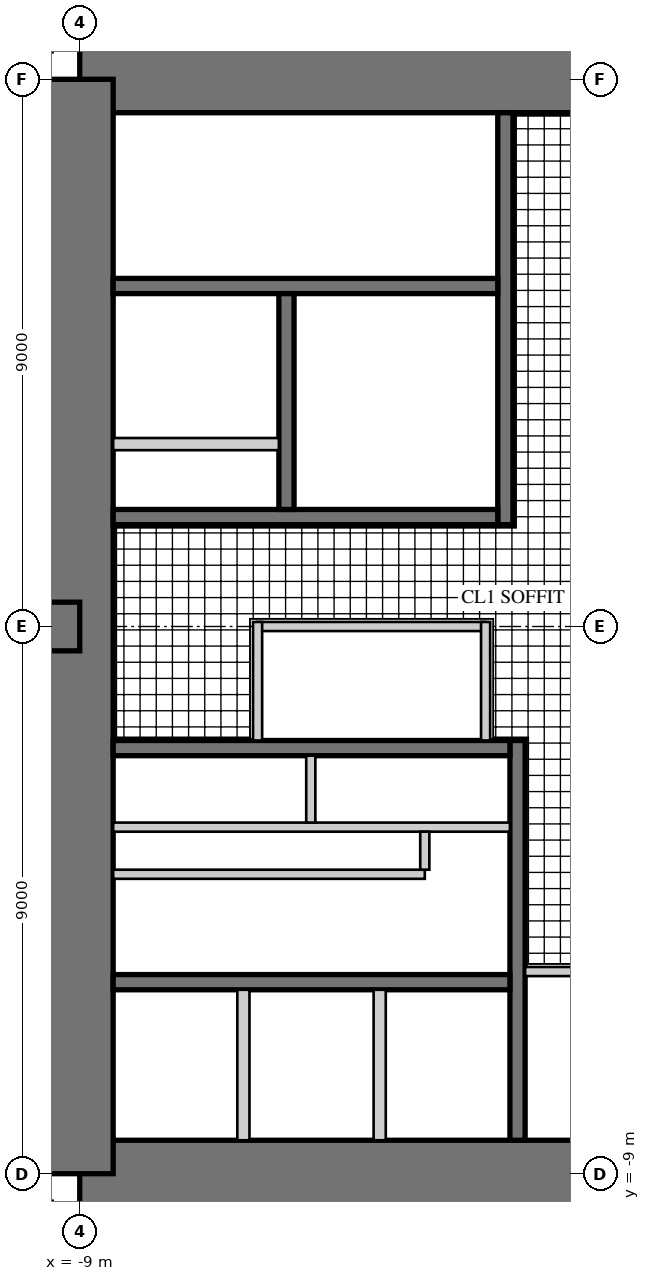
"""IFC4 building model, lengths in metres.
Left out: names, types, materials, properties, quantities, classifications, styles, units other than length and angle.
Written with IfcOpenShell. Run it as: python <this file> out.ifc"""

import sys

from ifc_helpers import new_model, si_unit, direction, frame, frame_2d, origin, place, context, subcontext, project, spatial, rectangle, extrude, element, fill, save


model = new_model("IFC4")
c1 = context("Model", 3, precision=1e-05, world=origin(), true_north=direction((0.0, 1.0)))
c2 = subcontext(c1, "Body", "Model", "MODEL_VIEW")
j1 = project(units=[si_unit("LENGTHUNIT", "METRE"), si_unit("PLANEANGLEUNIT", "RADIAN")], contexts=[c1])
p1 = place(None, origin())
s1 = spatial("IfcSite", under=j1, at=p1, CompositionType="ELEMENT")
p2 = place(p1, origin())
s2 = spatial("IfcBuilding", under=s1, at=p2, CompositionType="ELEMENT")
p3 = place(p2, frame((0.0, 0.0, 206.9)))
s3 = spatial("IfcBuildingStorey", under=s2, at=p3, CompositionType="ELEMENT", Elevation=206.9)
p4 = place(p3, frame((9.0, 9.0, 0.0), z_axis=(0.0, 0.0, 1.0), x_axis=(-1.0, 0.0, 0.0)))
e1 = element("IfcWall", 1, at=p4, inside=s3, PredefinedType="SHEAR", context=c2, shape_type="SweptSolid", body=[
    extrude(rectangle(XDim=18.0, YDim=1.1, at=frame_2d((9.0, 0.0))), origin(), (0.0, 0.0, 1.0), 3.4),
])
p5 = place(p4, frame((9.8, 0.0, 0.0)))
e2 = element("IfcOpeningElement", 2, at=p5, cuts=e1, PredefinedType="OPENING", context=c2, shape_type="SweptSolid", body=[
    extrude(rectangle(XDim=1.0, YDim=2.4, at=frame_2d((0.5, 1.2))), frame((0.0, 0.56, 0.0), z_axis=(0.0, -1.0, 0.0), x_axis=(1.0, 0.0, 0.0)), (0.0, 0.0, 1.0), 1.12),
])
p6 = place(p3, frame((-9.0, -9.0, 0.0), z_axis=(0.0, 0.0, 1.0), x_axis=(1.0, 0.0, 0.0)))
e3 = element("IfcWall", 3, at=p6, inside=s3, PredefinedType="SHEAR", context=c2, shape_type="SweptSolid", body=[
    extrude(rectangle(XDim=18.0, YDim=1.1, at=frame_2d((9.0, 0.0))), origin(), (0.0, 0.0, 1.0), 3.4),
])
p7 = place(p6, frame((9.8, 0.0, 0.0)))
e4 = element("IfcOpeningElement", 4, at=p7, cuts=e3, PredefinedType="OPENING", context=c2, shape_type="SweptSolid", body=[
    extrude(rectangle(XDim=1.0, YDim=2.4, at=frame_2d((0.5, 1.2))), frame((0.0, 0.56, 0.0), z_axis=(0.0, -1.0, 0.0), x_axis=(1.0, 0.0, 0.0)), (0.0, 0.0, 1.0), 1.12),
])
p8 = place(p3, frame((-9.0, 9.0, 0.0), z_axis=(0.0, 0.0, 1.0), x_axis=(0.0, -1.0, 0.0)))
e5 = element("IfcWall", 5, at=p8, inside=s3, PredefinedType="SHEAR", context=c2, shape_type="SweptSolid", body=[
    extrude(rectangle(XDim=18.0, YDim=1.1, at=frame_2d((9.0, 0.0))), origin(), (0.0, 0.0, 1.0), 3.4),
])
p9 = place(p8, frame((9.8, 0.0, 0.0)))
e6 = element("IfcOpeningElement", 6, at=p9, cuts=e5, PredefinedType="OPENING", context=c2, shape_type="SweptSolid", body=[
    extrude(rectangle(XDim=1.0, YDim=2.4, at=frame_2d((0.5, 1.2))), frame((0.0, 0.56, 0.0), z_axis=(0.0, -1.0, 0.0), x_axis=(1.0, 0.0, 0.0)), (0.0, 0.0, 1.0), 1.12),
])
p10 = place(p3, frame((-2.0, 1.675, 0.0), z_axis=(0.0, 0.0, 1.0), x_axis=(0.0, 1.0, 0.0)))
e7 = element("IfcWall", 7, at=p10, inside=s3, PredefinedType="SHEAR", context=c2, shape_type="SweptSolid", body=[
    extrude(rectangle(XDim=6.775, YDim=0.25, at=frame_2d((3.387, 0.0))), origin(), (0.0, 0.0, 1.0), 3.4),
])
p11 = place(p10, frame((0.725, 0.0, 0.0)))
e8 = element("IfcOpeningElement", 8, at=p11, cuts=e7, PredefinedType="OPENING", context=c2, shape_type="SweptSolid", body=[
    extrude(rectangle(XDim=1.0, YDim=2.1, at=frame_2d((0.5, 1.05))), frame((0.0, 0.135, 0.0), z_axis=(0.0, -1.0, 0.0), x_axis=(1.0, 0.0, 0.0)), (0.0, 0.0, 1.0), 0.27),
])
p12 = place(p3, frame((-2.125, 1.8, 0.0), z_axis=(0.0, 0.0, 1.0), x_axis=(-1.0, 0.0, 0.0)))
e9 = element("IfcWall", 9, at=p12, inside=s3, PredefinedType="SHEAR", context=c2, shape_type="SweptSolid", body=[
    extrude(rectangle(XDim=6.325, YDim=0.25, at=frame_2d((3.163, 0.0))), origin(), (0.0, 0.0, 1.0), 3.4),
])
p13 = place(p3, frame((-2.125, 5.6, 0.0), z_axis=(0.0, 0.0, 1.0), x_axis=(-1.0, 0.0, 0.0)))
e10 = element("IfcWall", 10, at=p13, inside=s3, PredefinedType="SHEAR", context=c2, shape_type="SweptSolid", body=[
    extrude(rectangle(XDim=6.325, YDim=0.25, at=frame_2d((3.163, 0.0))), origin(), (0.0, 0.0, 1.0), 3.4),
])
p14 = place(p13, frame((0.175, 0.0, 0.0)))
e11 = element("IfcOpeningElement", 11, at=p14, cuts=e10, PredefinedType="OPENING", context=c2, shape_type="SweptSolid", body=[
    extrude(rectangle(XDim=1.0, YDim=2.1, at=frame_2d((0.5, 1.05))), frame((0.0, 0.135, 0.0), z_axis=(0.0, -1.0, 0.0), x_axis=(1.0, 0.0, 0.0)), (0.0, 0.0, 1.0), 0.27),
])
p15 = place(p3, frame((-5.6, 1.925, 0.0), z_axis=(0.0, 0.0, 1.0), x_axis=(0.0, 1.0, 0.0)))
e12 = element("IfcWall", 12, at=p15, inside=s3, PredefinedType="SHEAR", context=c2, shape_type="SweptSolid", body=[
    extrude(rectangle(XDim=3.55, YDim=0.25, at=frame_2d((1.775, 0.0))), origin(), (0.0, 0.0, 1.0), 3.4),
])
p16 = place(p15, frame((1.525, 0.0, 0.0)))
e13 = element("IfcOpeningElement", 13, at=p16, cuts=e12, PredefinedType="OPENING", context=c2, shape_type="SweptSolid", body=[
    extrude(rectangle(XDim=1.1, YDim=2.2, at=frame_2d((0.55, 1.1))), frame((0.0, 0.135, 0.0), z_axis=(0.0, -1.0, 0.0), x_axis=(1.0, 0.0, 0.0)), (0.0, 0.0, 1.0), 0.27),
])
p17 = place(p15, frame((0.075, 0.0, 0.0)))
e14 = element("IfcOpeningElement", 14, at=p17, cuts=e12, PredefinedType="OPENING", context=c2, shape_type="SweptSolid", body=[
    extrude(rectangle(XDim=0.8, YDim=2.1, at=frame_2d((0.4, 1.05))), frame((0.0, 0.135, 0.0), z_axis=(0.0, -1.0, 0.0), x_axis=(1.0, 0.0, 0.0)), (0.0, 0.0, 1.0), 0.27),
])
p18 = place(p3, frame((-5.725, 3.0, 0.0), z_axis=(0.0, 0.0, 1.0), x_axis=(-1.0, 0.0, 0.0)))
e15 = element("IfcWall", 15, at=p18, inside=s3, PredefinedType="PARTITIONING", context=c2, shape_type="SweptSolid", body=[
    extrude(rectangle(XDim=2.725, YDim=0.2, at=frame_2d((1.362, 0.0))), origin(), (0.0, 0.0, 1.0), 3.4),
])
p19 = place(p3, frame((-1.8, -1.875, 0.0), z_axis=(0.0, 0.0, 1.0), x_axis=(0.0, -1.0, 0.0)))
e16 = element("IfcWall", 16, at=p19, inside=s3, PredefinedType="SHEAR", context=c2, shape_type="SweptSolid", body=[
    extrude(rectangle(XDim=6.575, YDim=0.25, at=frame_2d((3.288, 0.0))), origin(), (0.0, 0.0, 1.0), 3.4),
])
p20 = place(p19, frame((1.875, 0.0, 0.0)))
e17 = element("IfcOpeningElement", 17, at=p20, cuts=e16, PredefinedType="OPENING", context=c2, shape_type="SweptSolid", body=[
    extrude(rectangle(XDim=1.6, YDim=2.4, at=frame_2d((0.8, 1.2))), frame((0.0, 0.135, 0.0), z_axis=(0.0, -1.0, 0.0), x_axis=(1.0, 0.0, 0.0)), (0.0, 0.0, 1.0), 0.27),
])
p21 = place(p3, frame((-1.925, -2.0, 0.0), z_axis=(0.0, 0.0, 1.0), x_axis=(-1.0, 0.0, 0.0)))
e18 = element("IfcWall", 18, at=p21, inside=s3, PredefinedType="SHEAR", context=c2, shape_type="SweptSolid", body=[
    extrude(rectangle(XDim=6.525, YDim=0.25, at=frame_2d((3.262, 0.0))), origin(), (0.0, 0.0, 1.0), 3.4),
])
p22 = place(p3, frame((-1.925, -5.85, 0.0), z_axis=(0.0, 0.0, 1.0), x_axis=(-1.0, 0.0, 0.0)))
e19 = element("IfcWall", 19, at=p22, inside=s3, PredefinedType="SHEAR", context=c2, shape_type="SweptSolid", body=[
    extrude(rectangle(XDim=6.525, YDim=0.25, at=frame_2d((3.262, 0.0))), origin(), (0.0, 0.0, 1.0), 3.4),
])
p23 = place(p22, frame((0.471, 0.0, 0.0)))
e20 = element("IfcOpeningElement", 20, at=p23, cuts=e19, PredefinedType="OPENING", context=c2, shape_type="SweptSolid", body=[
    extrude(rectangle(XDim=1.1, YDim=2.2, at=frame_2d((0.55, 1.1))), frame((0.0, 0.135, 0.0), z_axis=(0.0, -1.0, 0.0), x_axis=(1.0, 0.0, 0.0)), (0.0, 0.0, 1.0), 0.27),
])
p24 = place(p22, frame((2.712, 0.0, 0.0)))
e21 = element("IfcOpeningElement", 21, at=p24, cuts=e19, PredefinedType="OPENING", context=c2, shape_type="SweptSolid", body=[
    extrude(rectangle(XDim=1.1, YDim=2.2, at=frame_2d((0.55, 1.1))), frame((0.0, 0.135, 0.0), z_axis=(0.0, -1.0, 0.0), x_axis=(1.0, 0.0, 0.0)), (0.0, 0.0, 1.0), 0.27),
])
p25 = place(p22, frame((4.954, 0.0, 0.0)))
e22 = element("IfcOpeningElement", 22, at=p25, cuts=e19, PredefinedType="OPENING", context=c2, shape_type="SweptSolid", body=[
    extrude(rectangle(XDim=1.1, YDim=2.2, at=frame_2d((0.55, 1.1))), frame((0.0, 0.135, 0.0), z_axis=(0.0, -1.0, 0.0), x_axis=(1.0, 0.0, 0.0)), (0.0, 0.0, 1.0), 0.27),
])
p26 = place(p3, frame((-1.925, -3.3, 0.0), z_axis=(0.0, 0.0, 1.0), x_axis=(-1.0, 0.0, 0.0)))
e23 = element("IfcWall", 23, at=p26, inside=s3, PredefinedType="PARTITIONING", context=c2, shape_type="SweptSolid", body=[
    extrude(rectangle(XDim=6.525, YDim=0.15, at=frame_2d((3.262, 0.0))), origin(), (0.0, 0.0, 1.0), 3.4),
])
p27 = place(p26, frame((0.075, 0.0, 0.0)))
e24 = element("IfcOpeningElement", 24, at=p27, cuts=e23, PredefinedType="OPENING", context=c2, shape_type="SweptSolid", body=[
    extrude(rectangle(XDim=0.8, YDim=2.1, at=frame_2d((0.4, 1.05))), frame((0.0, 0.085, 0.0), z_axis=(0.0, -1.0, 0.0), x_axis=(1.0, 0.0, 0.0)), (0.0, 0.0, 1.0), 0.17),
])
p28 = place(p26, frame((3.675, 0.0, 0.0)))
e25 = element("IfcOpeningElement", 25, at=p28, cuts=e23, PredefinedType="OPENING", context=c2, shape_type="SweptSolid", body=[
    extrude(rectangle(XDim=0.8, YDim=2.1, at=frame_2d((0.4, 1.05))), frame((0.0, 0.085, 0.0), z_axis=(0.0, -1.0, 0.0), x_axis=(1.0, 0.0, 0.0)), (0.0, 0.0, 1.0), 0.17),
])
p29 = place(p3, frame((-5.2, -2.125, 0.0), z_axis=(0.0, 0.0, 1.0), x_axis=(0.0, -1.0, 0.0)))
e26 = element("IfcWall", 26, at=p29, inside=s3, PredefinedType="PARTITIONING", context=c2, shape_type="SweptSolid", body=[
    extrude(rectangle(XDim=1.1, YDim=0.15, at=frame_2d((0.55, 0.0))), origin(), (0.0, 0.0, 1.0), 3.4),
])
for number, where, z_axis, x_axis in (
    (27, (-4.067, -5.975, 0.0), (0.0, 0.0, 1.0), (0.0, -1.0, 0.0)),
    (28, (-6.308, -5.975, 0.0), (0.0, 0.0, 1.0), (0.0, -1.0, 0.0)),
):
    element("IfcWall", number, at=place(p3, frame(where, z_axis=z_axis, x_axis=x_axis)), inside=s3, PredefinedType="PARTITIONING", context=c2, shape_type="SweptSolid", body=[
        extrude(rectangle(XDim=2.475, YDim=0.2, at=frame_2d((1.237, 0.0))), origin(), (0.0, 0.0, 1.0), 3.4),
    ])
p30 = place(p3, frame((-9.0, 0.0, 0.0), z_axis=(0.0, 0.0, 1.0), x_axis=(-1.0, 0.0, 0.0)))
e29 = element("IfcWall", 29, at=p30, inside=s3, PredefinedType="SHEAR", context=c2, shape_type="SweptSolid", body=[
    extrude(rectangle(XDim=18.0, YDim=0.8, at=frame_2d((9.0, 0.0))), origin(), (0.0, 0.0, 1.0), 3.4),
])
p31 = place(p30, frame((3.95, 0.0, 0.0)))
e30 = element("IfcOpeningElement", 30, at=p31, cuts=e29, PredefinedType="OPENING", context=c2, shape_type="SweptSolid", body=[
    extrude(rectangle(XDim=1.0, YDim=2.15, at=frame_2d((0.5, 1.075))), frame((0.0, 0.41, 0.0), z_axis=(0.0, -1.0, 0.0), x_axis=(1.0, 0.0, 0.0)), (0.0, 0.0, 1.0), 0.82),
])
p32 = place(p30, frame((6.6, 0.0, 0.0)))
e31 = element("IfcOpeningElement", 31, at=p32, cuts=e29, PredefinedType="OPENING", context=c2, shape_type="SweptSolid", body=[
    extrude(rectangle(XDim=1.0, YDim=2.15, at=frame_2d((0.5, 1.075))), frame((0.0, 0.41, 0.0), z_axis=(0.0, -1.0, 0.0), x_axis=(1.0, 0.0, 0.0)), (0.0, 0.0, 1.0), 0.82),
])
p33 = place(p30, frame((13.25, 0.0, 0.0)))
e32 = element("IfcOpeningElement", 32, at=p33, cuts=e29, PredefinedType="OPENING", context=c2, shape_type="SweptSolid", body=[
    extrude(rectangle(XDim=1.0, YDim=2.2, at=frame_2d((0.5, 1.1))), frame((0.0, 0.41, 0.0), z_axis=(0.0, -1.0, 0.0), x_axis=(1.0, 0.0, 0.0)), (0.0, 0.0, 1.0), 0.82),
])
p34 = place(p3, frame((-9.445, 9.57, 0.0), z_axis=(0.0, 0.0, 1.0), x_axis=(-1.0, 0.0, 0.0)))
e33 = element("IfcWall", 33, at=p34, inside=s3, PredefinedType="SOLIDWALL", context=c2, shape_type="SweptSolid", body=[
    extrude(rectangle(XDim=3.125, YDim=0.25, at=frame_2d((1.562, 0.0))), origin(), (0.0, 0.0, 1.0), 3.22),
])
p35 = place(p34, frame((0.6, 0.0, 0.0)))
e34 = element("IfcOpeningElement", 34, at=p35, cuts=e33, PredefinedType="OPENING", context=c2, shape_type="SweptSolid", body=[
    extrude(rectangle(XDim=1.0, YDim=2.2, at=frame_2d((0.5, 1.1))), frame((0.0, 0.135, 0.0), z_axis=(0.0, -1.0, 0.0), x_axis=(1.0, 0.0, 0.0)), (0.0, 0.0, 1.0), 0.27),
])
p36 = place(p3, frame((-9.57, -9.445, 0.0), z_axis=(0.0, 0.0, 1.0), x_axis=(0.0, -1.0, 0.0)))
e35 = element("IfcWall", 35, at=p36, inside=s3, PredefinedType="SOLIDWALL", context=c2, shape_type="SweptSolid", body=[
    extrude(rectangle(XDim=3.125, YDim=0.25, at=frame_2d((1.562, 0.0))), origin(), (0.0, 0.0, 1.0), 3.22),
])
p37 = place(p36, frame((0.6, 0.0, 0.0)))
e36 = element("IfcOpeningElement", 36, at=p37, cuts=e35, PredefinedType="OPENING", context=c2, shape_type="SweptSolid", body=[
    extrude(rectangle(XDim=1.0, YDim=2.2, at=frame_2d((0.5, 1.1))), frame((0.0, 0.135, 0.0), z_axis=(0.0, -1.0, 0.0), x_axis=(1.0, 0.0, 0.0)), (0.0, 0.0, 1.0), 0.27),
])
p38 = place(p3, frame((-2.325, 0.0, 0.0), z_axis=(0.0, 0.0, 1.0), x_axis=(-1.0, 0.0, 0.0)))
e37 = element("IfcWall", 37, at=p38, inside=s3, PredefinedType="PARTITIONING", context=c2, shape_type="SweptSolid", body=[
    extrude(rectangle(XDim=3.75, YDim=0.15, at=frame_2d((1.875, 0.0))), origin(), (0.0, 0.0, 1.0), 3.22),
])
p39 = place(p38, frame((0.4, 0.0, 0.0)))
e38 = element("IfcOpeningElement", 38, at=p39, cuts=e37, PredefinedType="OPENING", context=c2, shape_type="SweptSolid", body=[
    extrude(rectangle(XDim=1.0, YDim=2.1, at=frame_2d((0.5, 1.05))), frame((0.0, 0.085, 0.0), z_axis=(0.0, -1.0, 0.0), x_axis=(1.0, 0.0, 0.0)), (0.0, 0.0, 1.0), 0.17),
])
for number, where, z_axis, x_axis in (
    (39, (-2.325, -1.875, 0.0), (0.0, 0.0, 1.0), (0.0, 1.0, 0.0)),
    (40, (-6.075, 0.075, 0.0), (0.0, 0.0, 1.0), (0.0, -1.0, 0.0)),
):
    element("IfcWall", number, at=place(p3, frame(where, z_axis=z_axis, x_axis=x_axis)), inside=s3, PredefinedType="PARTITIONING", context=c2, shape_type="SweptSolid", body=[
        extrude(rectangle(XDim=1.95, YDim=0.15, at=frame_2d((0.975, 0.0))), origin(), (0.0, 0.0, 1.0), 3.22),
    ])
p40 = place(p3, frame((-1.675, -5.675, 0.0), z_axis=(0.0, 0.0, 1.0), x_axis=(1.0, 0.0, 0.0)))
e41 = element("IfcWall", 41, at=p40, inside=s3, PredefinedType="PARTITIONING", context=c2, shape_type="SweptSolid", body=[
    extrude(rectangle(XDim=1.75, YDim=0.15, at=frame_2d((0.875, 0.0))), origin(), (0.0, 0.0, 1.0), 3.22),
])
p41 = place(p3, frame((-3.325, -4.075, 0.0), z_axis=(0.0, 0.0, 1.0), x_axis=(-1.0, 0.0, 0.0)))
e42 = element("IfcWall", 42, at=p41, inside=s3, PredefinedType="PARTITIONING", context=c2, shape_type="SweptSolid", body=[
    extrude(rectangle(XDim=5.125, YDim=0.15, at=frame_2d((2.562, 0.0))), origin(), (0.0, 0.0, 1.0), 3.22),
])
p42 = place(p41, frame((2.062, 0.0, 0.0)))
e43 = element("IfcOpeningElement", 43, at=p42, cuts=e42, PredefinedType="OPENING", context=c2, shape_type="SweptSolid", body=[
    extrude(rectangle(XDim=1.0, YDim=2.1, at=frame_2d((0.5, 1.05))), frame((0.0, 0.085, 0.0), z_axis=(0.0, -1.0, 0.0), x_axis=(1.0, 0.0, 0.0)), (0.0, 0.0, 1.0), 0.17),
])
p43 = place(p3, frame((-3.325, -3.375, 0.0), z_axis=(0.0, 0.0, 1.0), x_axis=(0.0, -1.0, 0.0)))
e44 = element("IfcWall", 44, at=p43, inside=s3, PredefinedType="PARTITIONING", context=c2, shape_type="SweptSolid", body=[
    extrude(rectangle(XDim=0.625, YDim=0.15, at=frame_2d((0.312, 0.0))), origin(), (0.0, 0.0, 1.0), 3.22),
])
p44 = place(p39, origin())
e45 = element("IfcDoor", 45, at=p44, inside=s3, OperationType="SINGLE_SWING_LEFT", PredefinedType="DOOR", context=c2, shape_type="SweptSolid", body=[
    extrude(rectangle(XDim=1.0, YDim=2.1, at=frame_2d((0.5, 1.05))), frame((0.0, 0.025, 0.0), z_axis=(0.0, -1.0, 0.0), x_axis=(1.0, 0.0, 0.0)), (0.0, 0.0, 1.0), 0.05),
])
fill(e38, e45)
p45 = place(p42, frame((1.0, 0.0, 0.0), z_axis=(0.0, 0.0, 1.0), x_axis=(-1.0, 0.0, 0.0)))
e46 = element("IfcDoor", 46, at=p45, inside=s3, OperationType="DOUBLE_DOOR_SINGLE_SWING", PredefinedType="DOOR", context=c2, shape_type="SweptSolid", body=[
    extrude(rectangle(XDim=1.0, YDim=2.1, at=frame_2d((0.5, 1.05))), frame((0.0, 0.025, 0.0), z_axis=(0.0, -1.0, 0.0), x_axis=(1.0, 0.0, 0.0)), (0.0, 0.0, 1.0), 0.05),
])
fill(e43, e46)
p46 = place(p5, origin())
e47 = element("IfcDoor", 47, at=p46, inside=s3, OperationType="SINGLE_SWING_RIGHT", PredefinedType="DOOR", context=c2, shape_type="SweptSolid", body=[
    extrude(rectangle(XDim=1.0, YDim=2.4, at=frame_2d((0.5, 1.2))), frame((0.0, 0.055, 0.0), z_axis=(0.0, -1.0, 0.0), x_axis=(1.0, 0.0, 0.0)), (0.0, 0.0, 1.0), 0.05),
])
fill(e2, e47)
p47 = place(p9, origin())
e48 = element("IfcDoor", 48, at=p47, inside=s3, OperationType="SINGLE_SWING_RIGHT", PredefinedType="DOOR", context=c2, shape_type="SweptSolid", body=[
    extrude(rectangle(XDim=1.0, YDim=2.4, at=frame_2d((0.5, 1.2))), frame((0.0, 0.055, 0.0), z_axis=(0.0, -1.0, 0.0), x_axis=(1.0, 0.0, 0.0)), (0.0, 0.0, 1.0), 0.05),
])
fill(e6, e48)
p48 = place(p11, origin())
e49 = element("IfcDoor", 49, at=p48, inside=s3, OperationType="SINGLE_SWING_LEFT", PredefinedType="DOOR", context=c2, shape_type="SweptSolid", body=[
    extrude(rectangle(XDim=1.0, YDim=2.1, at=frame_2d((0.5, 1.05))), frame((0.0, 0.025, 0.0), z_axis=(0.0, -1.0, 0.0), x_axis=(1.0, 0.0, 0.0)), (0.0, 0.0, 1.0), 0.05),
])
fill(e8, e49)
p49 = place(p14, frame((1.0, 0.0, 0.0), z_axis=(0.0, 0.0, 1.0), x_axis=(-1.0, 0.0, 0.0)))
e50 = element("IfcDoor", 50, at=p49, inside=s3, OperationType="SINGLE_SWING_RIGHT", PredefinedType="DOOR", context=c2, shape_type="SweptSolid", body=[
    extrude(rectangle(XDim=1.0, YDim=2.1, at=frame_2d((0.5, 1.05))), frame((0.0, 0.025, 0.0), z_axis=(0.0, -1.0, 0.0), x_axis=(1.0, 0.0, 0.0)), (0.0, 0.0, 1.0), 0.05),
])
fill(e11, e50)
p50 = place(p16, origin())
e51 = element("IfcDoor", 51, at=p50, inside=s3, OperationType="DOUBLE_DOOR_SLIDING", PredefinedType="DOOR", context=c2, shape_type="SweptSolid", body=[
    extrude(rectangle(XDim=1.1, YDim=2.2, at=frame_2d((0.55, 1.1))), frame((0.0, 0.025, 0.0), z_axis=(0.0, -1.0, 0.0), x_axis=(1.0, 0.0, 0.0)), (0.0, 0.0, 1.0), 0.05),
])
fill(e13, e51)
p51 = place(p17, origin())
e52 = element("IfcDoor", 52, at=p51, inside=s3, OperationType="SINGLE_SWING_LEFT", PredefinedType="DOOR", context=c2, shape_type="SweptSolid", body=[
    extrude(rectangle(XDim=0.8, YDim=2.1, at=frame_2d((0.4, 1.05))), frame((0.0, 0.025, 0.0), z_axis=(0.0, -1.0, 0.0), x_axis=(1.0, 0.0, 0.0)), (0.0, 0.0, 1.0), 0.05),
])
fill(e14, e52)
p52 = place(p23, origin())
e53 = element("IfcDoor", 53, at=p52, inside=s3, OperationType="DOUBLE_DOOR_SLIDING", PredefinedType="DOOR", context=c2, shape_type="SweptSolid", body=[
    extrude(rectangle(XDim=1.1, YDim=2.2, at=frame_2d((0.55, 1.1))), frame((0.0, 0.025, 0.0), z_axis=(0.0, -1.0, 0.0), x_axis=(1.0, 0.0, 0.0)), (0.0, 0.0, 1.0), 0.05),
])
fill(e20, e53)
p53 = place(p24, origin())
e54 = element("IfcDoor", 54, at=p53, inside=s3, OperationType="DOUBLE_DOOR_SLIDING", PredefinedType="DOOR", context=c2, shape_type="SweptSolid", body=[
    extrude(rectangle(XDim=1.1, YDim=2.2, at=frame_2d((0.55, 1.1))), frame((0.0, 0.025, 0.0), z_axis=(0.0, -1.0, 0.0), x_axis=(1.0, 0.0, 0.0)), (0.0, 0.0, 1.0), 0.05),
])
fill(e21, e54)
p54 = place(p25, origin())
e55 = element("IfcDoor", 55, at=p54, inside=s3, OperationType="DOUBLE_DOOR_SLIDING", PredefinedType="DOOR", context=c2, shape_type="SweptSolid", body=[
    extrude(rectangle(XDim=1.1, YDim=2.2, at=frame_2d((0.55, 1.1))), frame((0.0, 0.025, 0.0), z_axis=(0.0, -1.0, 0.0), x_axis=(1.0, 0.0, 0.0)), (0.0, 0.0, 1.0), 0.05),
])
fill(e22, e55)
p55 = place(p20, origin())
e56 = element("IfcDoor", 56, at=p55, inside=s3, OperationType="DOUBLE_DOOR_DOUBLE_SWING", PredefinedType="DOOR", context=c2, shape_type="SweptSolid", body=[
    extrude(rectangle(XDim=1.6, YDim=2.4, at=frame_2d((0.8, 1.2))), frame((0.0, 0.025, 0.0), z_axis=(0.0, -1.0, 0.0), x_axis=(1.0, 0.0, 0.0)), (0.0, 0.0, 1.0), 0.05),
])
fill(e17, e56)
p56 = place(p27, frame((0.8, 0.0, 0.0), z_axis=(0.0, 0.0, 1.0), x_axis=(-1.0, 0.0, 0.0)))
e57 = element("IfcDoor", 57, at=p56, inside=s3, OperationType="SINGLE_SWING_RIGHT", PredefinedType="DOOR", context=c2, shape_type="SweptSolid", body=[
    extrude(rectangle(XDim=0.8, YDim=2.1, at=frame_2d((0.4, 1.05))), frame((0.0, 0.025, 0.0), z_axis=(0.0, -1.0, 0.0), x_axis=(1.0, 0.0, 0.0)), (0.0, 0.0, 1.0), 0.05),
])
fill(e24, e57)
p57 = place(p28, frame((0.8, 0.0, 0.0), z_axis=(0.0, 0.0, 1.0), x_axis=(-1.0, 0.0, 0.0)))
e58 = element("IfcDoor", 58, at=p57, inside=s3, OperationType="SINGLE_SWING_RIGHT", PredefinedType="DOOR", context=c2, shape_type="SweptSolid", body=[
    extrude(rectangle(XDim=0.8, YDim=2.1, at=frame_2d((0.4, 1.05))), frame((0.0, 0.025, 0.0), z_axis=(0.0, -1.0, 0.0), x_axis=(1.0, 0.0, 0.0)), (0.0, 0.0, 1.0), 0.05),
])
fill(e25, e58)
save(model, sys.argv[1])
